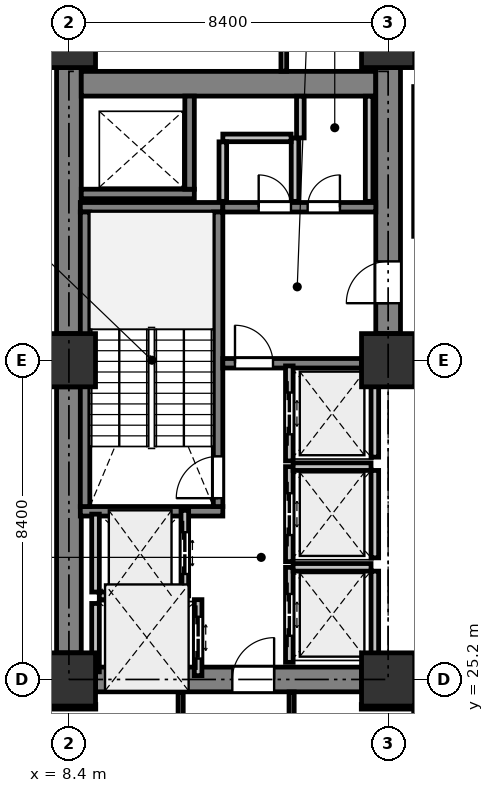
"""IFC4 building model, lengths in metres.
Left out: names, types, materials, properties, quantities, classifications, styles, units other than length and angle.
Written with IfcOpenShell. Run it as: python <this file> out.ifc"""

import sys

from ifc_helpers import new_model, si_unit, direction, frame, frame_2d, origin, origin_2d, place, context, subcontext, project, spatial, rectangle, extrude, element, fill, save


model = new_model("IFC4")
c1 = context("Model", 3, precision=1e-05, world=origin(), true_north=direction((0.0, 1.0)))
c2 = subcontext(c1, "Body", "Model", "MODEL_VIEW")
j1 = project(units=[si_unit("LENGTHUNIT", "METRE"), si_unit("PLANEANGLEUNIT", "RADIAN")], contexts=[c1])
p1 = place(None, origin())
s1 = spatial("IfcSite", under=j1, at=p1, CompositionType="ELEMENT")
p2 = place(p1, origin())
s2 = spatial("IfcBuilding", under=s1, at=p2, CompositionType="ELEMENT")
p3 = place(p2, frame((0.0, 0.0, 50.0)))
s3 = spatial("IfcBuildingStorey", under=s2, at=p3, CompositionType="ELEMENT", Elevation=50.0)
for number, where, z_axis, x_axis in (
    (1, (8.4, 25.2, 0.0), (0.0, 0.0, 1.0), (1.0, 0.0, 0.0)),
    (2, (8.4, 33.6, 0.0), (0.0, 0.0, 1.0), (1.0, 0.0, 0.0)),
    (3, (8.4, 42.0, 0.0), (0.0, 0.0, 1.0), (1.0, 0.0, 0.0)),
    (4, (16.8, 25.2, 0.0), (0.0, 0.0, 1.0), (1.0, 0.0, 0.0)),
    (5, (16.8, 33.6, 0.0), (0.0, 0.0, 1.0), (1.0, 0.0, 0.0)),
    (6, (16.8, 42.0, 0.0), (0.0, 0.0, 1.0), (1.0, 0.0, 0.0)),
):
    element("IfcColumn", number, at=place(p3, frame(where, z_axis=z_axis, x_axis=x_axis)), inside=s3, PredefinedType="COLUMN", context=c2, shape_type="SweptSolid", body=[
        extrude(rectangle(XDim=1.4, YDim=1.4, at=origin_2d()), origin(), (0.0, 0.0, 1.0), 4.2),
    ])
for number, where, z_axis, x_axis in (
    (7, (8.4, 25.9, 0.0), (0.0, 0.0, 1.0), (0.0, 1.0, 0.0)),
    (8, (8.4, 34.3, 0.0), (0.0, 0.0, 1.0), (0.0, 1.0, 0.0)),
):
    element("IfcWall", number, at=place(p3, frame(where, z_axis=z_axis, x_axis=x_axis)), inside=s3, PredefinedType="SHEAR", context=c2, shape_type="SweptSolid", body=[
        extrude(rectangle(XDim=7.0, YDim=0.65, at=frame_2d((3.5, 0.0))), origin(), (0.0, 0.0, 1.0), 3.925),
    ])
p4 = place(p3, frame((8.725, 40.875, 0.0), z_axis=(0.0, 0.0, 1.0), x_axis=(1.0, 0.0, 0.0)))
e9 = element("IfcWall", 9, at=p4, inside=s3, PredefinedType="SHEAR", context=c2, shape_type="SweptSolid", body=[
    extrude(rectangle(XDim=7.75, YDim=0.65, at=frame_2d((3.875, 0.0))), origin(), (0.0, 0.0, 1.0), 3.925),
])
p5 = place(p3, frame((16.8, 34.3, 0.0), z_axis=(0.0, 0.0, 1.0), x_axis=(0.0, 1.0, 0.0)))
e10 = element("IfcWall", 10, at=p5, inside=s3, PredefinedType="SHEAR", context=c2, shape_type="SweptSolid", body=[
    extrude(rectangle(XDim=7.0, YDim=0.65, at=frame_2d((3.5, 0.0))), origin(), (0.0, 0.0, 1.0), 3.925),
])
p6 = place(p5, frame((0.8, 0.0, 0.0)))
e11 = element("IfcOpeningElement", 11, at=p6, cuts=e10, PredefinedType="OPENING", context=c2, shape_type="SweptSolid", body=[
    extrude(rectangle(XDim=1.1, YDim=2.15, at=frame_2d((0.55, 1.075))), frame((0.0, 0.335, 0.0), z_axis=(0.0, -1.0, 0.0), x_axis=(1.0, 0.0, 0.0)), (0.0, 0.0, 1.0), 0.67),
])
p7 = place(p3, frame((9.1, 25.2, 0.0), z_axis=(0.0, 0.0, 1.0), x_axis=(1.0, 0.0, 0.0)))
e12 = element("IfcWall", 12, at=p7, inside=s3, PredefinedType="SHEAR", context=c2, shape_type="SweptSolid", body=[
    extrude(rectangle(XDim=7.0, YDim=0.65, at=frame_2d((3.5, 0.0))), origin(), (0.0, 0.0, 1.0), 3.925),
])
p8 = place(p7, frame((3.6, 0.0, 0.0)))
e13 = element("IfcOpeningElement", 13, at=p8, cuts=e12, PredefinedType="OPENING", context=c2, shape_type="SweptSolid", body=[
    extrude(rectangle(XDim=1.1, YDim=2.15, at=frame_2d((0.55, 1.075))), frame((0.0, 0.335, 0.0), z_axis=(0.0, -1.0, 0.0), x_axis=(1.0, 0.0, 0.0)), (0.0, 0.0, 1.0), 0.67),
])
for number, where, z_axis, x_axis in (
    (14, (12.45, 29.625, 0.0), (0.0, 0.0, 1.0), (-1.0, 0.0, 0.0)),
    (15, (12.45, 37.625, 0.0), (0.0, 0.0, 1.0), (-1.0, 0.0, 0.0)),
):
    element("IfcWall", number, at=place(p3, frame(where, z_axis=z_axis, x_axis=x_axis)), inside=s3, PredefinedType="SHEAR", context=c2, shape_type="SweptSolid", body=[
        extrude(rectangle(XDim=3.75, YDim=0.25, at=frame_2d((1.875, 0.0))), origin(), (0.0, 0.0, 1.0), 3.925),
    ])
p9 = place(p3, frame((12.325, 29.75, 0.0), z_axis=(0.0, 0.0, 1.0), x_axis=(0.0, 1.0, 0.0)))
e16 = element("IfcWall", 16, at=p9, inside=s3, PredefinedType="SHEAR", context=c2, shape_type="SweptSolid", body=[
    extrude(rectangle(XDim=7.75, YDim=0.25, at=frame_2d((3.875, 0.0))), origin(), (0.0, 0.0, 1.0), 3.925),
])
p10 = place(p9, frame((0.22, 0.0, 0.0)))
e17 = element("IfcOpeningElement", 17, at=p10, cuts=e16, PredefinedType="OPENING", context=c2, shape_type="SweptSolid", body=[
    extrude(rectangle(XDim=1.1, YDim=2.15, at=frame_2d((0.55, 1.075))), frame((0.0, 0.135, 0.0), z_axis=(0.0, -1.0, 0.0), x_axis=(1.0, 0.0, 0.0)), (0.0, 0.0, 1.0), 0.27),
])
p11 = place(p3, frame((8.825, 29.75, 0.0), z_axis=(0.0, 0.0, 1.0), x_axis=(0.0, 1.0, 0.0)))
e18 = element("IfcWall", 18, at=p11, inside=s3, PredefinedType="SHEAR", context=c2, shape_type="SweptSolid", body=[
    extrude(rectangle(XDim=7.75, YDim=0.25, at=frame_2d((3.875, 0.0))), origin(), (0.0, 0.0, 1.0), 3.925),
])
p12 = place(p3, frame((8.725, 37.975, 0.0), z_axis=(0.0, 0.0, 1.0), x_axis=(1.0, 0.0, 0.0)))
e19 = element("IfcWall", 19, at=p12, inside=s3, PredefinedType="SHEAR", context=c2, shape_type="SweptSolid", body=[
    extrude(rectangle(XDim=2.975, YDim=0.25, at=frame_2d((1.487, 0.0))), origin(), (0.0, 0.0, 1.0), 3.925),
])
p13 = place(p3, frame((11.575, 38.1, 0.0), z_axis=(0.0, 0.0, 1.0), x_axis=(0.0, 1.0, 0.0)))
e20 = element("IfcWall", 20, at=p13, inside=s3, PredefinedType="SHEAR", context=c2, shape_type="SweptSolid", body=[
    extrude(rectangle(XDim=2.45, YDim=0.25, at=frame_2d((1.225, 0.0))), origin(), (0.0, 0.0, 1.0), 3.925),
])
p14 = place(p3, frame((12.45, 33.52, 0.0), z_axis=(0.0, 0.0, 1.0), x_axis=(1.0, 0.0, 0.0)))
e21 = element("IfcWall", 21, at=p14, inside=s3, PredefinedType="SHEAR", context=c2, shape_type="SweptSolid", body=[
    extrude(rectangle(XDim=3.65, YDim=0.25, at=frame_2d((1.825, 0.0))), origin(), (0.0, 0.0, 1.0), 3.925),
])
p15 = place(p14, frame((0.32, 0.0, 0.0)))
e22 = element("IfcOpeningElement", 22, at=p15, cuts=e21, PredefinedType="OPENING", context=c2, shape_type="SweptSolid", body=[
    extrude(rectangle(XDim=1.0, YDim=2.15, at=frame_2d((0.5, 1.075))), frame((0.0, 0.135, 0.0), z_axis=(0.0, -1.0, 0.0), x_axis=(1.0, 0.0, 0.0)), (0.0, 0.0, 1.0), 0.27),
])
p16 = place(p3, frame((12.45, 37.625, 0.0), z_axis=(0.0, 0.0, 1.0), x_axis=(1.0, 0.0, 0.0)))
e23 = element("IfcWall", 23, at=p16, inside=s3, PredefinedType="SHEAR", context=c2, shape_type="SweptSolid", body=[
    extrude(rectangle(XDim=4.025, YDim=0.25, at=frame_2d((2.013, 0.0))), origin(), (0.0, 0.0, 1.0), 3.925),
])
p17 = place(p16, frame((0.944, 0.0, 0.0)))
e24 = element("IfcOpeningElement", 24, at=p17, cuts=e23, PredefinedType="OPENING", context=c2, shape_type="SweptSolid", body=[
    extrude(rectangle(XDim=0.85, YDim=2.15, at=frame_2d((0.425, 1.075))), frame((0.0, 0.135, 0.0), z_axis=(0.0, -1.0, 0.0), x_axis=(1.0, 0.0, 0.0)), (0.0, 0.0, 1.0), 0.27),
])
p18 = place(p16, frame((2.231, 0.0, 0.0)))
e25 = element("IfcOpeningElement", 25, at=p18, cuts=e23, PredefinedType="OPENING", context=c2, shape_type="SweptSolid", body=[
    extrude(rectangle(XDim=0.85, YDim=2.15, at=frame_2d((0.425, 1.075))), frame((0.0, 0.135, 0.0), z_axis=(0.0, -1.0, 0.0), x_axis=(1.0, 0.0, 0.0)), (0.0, 0.0, 1.0), 0.27),
])
p19 = place(p3, frame((11.45, 27.4, 0.0), z_axis=(0.0, 0.0, 1.0), x_axis=(0.0, 1.0, 0.0)))
e26 = element("IfcWall", 26, at=p19, inside=s3, PredefinedType="PARTITIONING", context=c2, shape_type="SweptSolid", body=[
    extrude(rectangle(XDim=2.25, YDim=0.2, at=frame_2d((1.125, 0.0))), origin(), (0.0, 0.0, 1.0), 3.925),
])
p20 = place(p19, frame((0.575, 0.0, 0.0)))
e27 = element("IfcOpeningElement", 27, at=p20, cuts=e26, PredefinedType="OPENING", context=c2, shape_type="SweptSolid", body=[
    extrude(rectangle(XDim=1.1, YDim=2.2, at=frame_2d((0.55, 1.1))), frame((0.0, 0.11, 0.0), z_axis=(0.0, -1.0, 0.0), x_axis=(1.0, 0.0, 0.0)), (0.0, 0.0, 1.0), 0.22),
])
p21 = place(p3, frame((9.1, 27.5, 0.0), z_axis=(0.0, 0.0, 1.0), x_axis=(0.0, 1.0, 0.0)))
e28 = element("IfcWall", 28, at=p21, inside=s3, PredefinedType="PARTITIONING", context=c2, shape_type="SweptSolid", body=[
    extrude(rectangle(XDim=2.05, YDim=0.2, at=frame_2d((1.025, 0.0))), origin(), (0.0, 0.0, 1.0), 3.925),
])
p22 = place(p3, frame((9.2, 27.4, 0.0), z_axis=(0.0, 0.0, 1.0), x_axis=(1.0, 0.0, 0.0)))
e29 = element("IfcWall", 29, at=p22, inside=s3, PredefinedType="PARTITIONING", context=c2, shape_type="SweptSolid", body=[
    extrude(rectangle(XDim=2.15, YDim=0.2, at=frame_2d((1.075, 0.0))), origin(), (0.0, 0.0, 1.0), 3.925),
])
p23 = place(p3, frame((11.8, 25.3, 0.0), z_axis=(0.0, 0.0, 1.0), x_axis=(0.0, 1.0, 0.0)))
e30 = element("IfcWall", 30, at=p23, inside=s3, PredefinedType="PARTITIONING", context=c2, shape_type="SweptSolid", body=[
    extrude(rectangle(XDim=2.0, YDim=0.2, at=frame_2d((1.0, 0.0))), origin(), (0.0, 0.0, 1.0), 3.925),
])
p24 = place(p23, frame((0.45, 0.0, 0.0)))
e31 = element("IfcOpeningElement", 31, at=p24, cuts=e30, PredefinedType="OPENING", context=c2, shape_type="SweptSolid", body=[
    extrude(rectangle(XDim=1.1, YDim=2.2, at=frame_2d((0.55, 1.1))), frame((0.0, 0.11, 0.0), z_axis=(0.0, -1.0, 0.0), x_axis=(1.0, 0.0, 0.0)), (0.0, 0.0, 1.0), 0.22),
])
p25 = place(p3, frame((9.1, 25.4, 0.0), z_axis=(0.0, 0.0, 1.0), x_axis=(0.0, 1.0, 0.0)))
e32 = element("IfcWall", 32, at=p25, inside=s3, PredefinedType="PARTITIONING", context=c2, shape_type="SweptSolid", body=[
    extrude(rectangle(XDim=1.8, YDim=0.2, at=frame_2d((0.9, 0.0))), origin(), (0.0, 0.0, 1.0), 3.925),
])
p26 = place(p3, frame((14.2, 25.65, 0.0), z_axis=(0.0, 0.0, 1.0), x_axis=(0.0, 1.0, 0.0)))
e33 = element("IfcWall", 33, at=p26, inside=s3, PredefinedType="PARTITIONING", context=c2, shape_type="SweptSolid", body=[
    extrude(rectangle(XDim=2.5, YDim=0.2, at=frame_2d((1.25, 0.0))), origin(), (0.0, 0.0, 1.0), 3.925),
])
p27 = place(p26, frame((0.7, 0.0, 0.0)))
e34 = element("IfcOpeningElement", 34, at=p27, cuts=e33, PredefinedType="OPENING", context=c2, shape_type="SweptSolid", body=[
    extrude(rectangle(XDim=1.1, YDim=2.2, at=frame_2d((0.55, 1.1))), frame((0.0, 0.11, 0.0), z_axis=(0.0, -1.0, 0.0), x_axis=(1.0, 0.0, 0.0)), (0.0, 0.0, 1.0), 0.22),
])
p28 = place(p3, frame((16.45, 25.75, 0.0), z_axis=(0.0, 0.0, 1.0), x_axis=(0.0, 1.0, 0.0)))
e35 = element("IfcWall", 35, at=p28, inside=s3, PredefinedType="PARTITIONING", context=c2, shape_type="SweptSolid", body=[
    extrude(rectangle(XDim=2.3, YDim=0.2, at=frame_2d((1.15, 0.0))), origin(), (0.0, 0.0, 1.0), 3.925),
])
p29 = place(p3, frame((14.3, 28.15, 0.0), z_axis=(0.0, 0.0, 1.0), x_axis=(1.0, 0.0, 0.0)))
e36 = element("IfcWall", 36, at=p29, inside=s3, PredefinedType="PARTITIONING", context=c2, shape_type="SweptSolid", body=[
    extrude(rectangle(XDim=2.05, YDim=0.2, at=frame_2d((1.025, 0.0))), origin(), (0.0, 0.0, 1.0), 3.925),
])
p30 = place(p3, frame((14.2, 28.3, 0.0), z_axis=(0.0, 0.0, 1.0), x_axis=(0.0, 1.0, 0.0)))
e37 = element("IfcWall", 37, at=p30, inside=s3, PredefinedType="PARTITIONING", context=c2, shape_type="SweptSolid", body=[
    extrude(rectangle(XDim=2.5, YDim=0.2, at=frame_2d((1.25, 0.0))), origin(), (0.0, 0.0, 1.0), 3.925),
])
p31 = place(p30, frame((0.7, 0.0, 0.0)))
e38 = element("IfcOpeningElement", 38, at=p31, cuts=e37, PredefinedType="OPENING", context=c2, shape_type="SweptSolid", body=[
    extrude(rectangle(XDim=1.1, YDim=2.2, at=frame_2d((0.55, 1.1))), frame((0.0, 0.11, 0.0), z_axis=(0.0, -1.0, 0.0), x_axis=(1.0, 0.0, 0.0)), (0.0, 0.0, 1.0), 0.22),
])
p32 = place(p3, frame((16.45, 28.4, 0.0), z_axis=(0.0, 0.0, 1.0), x_axis=(0.0, 1.0, 0.0)))
e39 = element("IfcWall", 39, at=p32, inside=s3, PredefinedType="PARTITIONING", context=c2, shape_type="SweptSolid", body=[
    extrude(rectangle(XDim=2.3, YDim=0.2, at=frame_2d((1.15, 0.0))), origin(), (0.0, 0.0, 1.0), 3.925),
])
p33 = place(p3, frame((14.3, 30.8, 0.0), z_axis=(0.0, 0.0, 1.0), x_axis=(1.0, 0.0, 0.0)))
e40 = element("IfcWall", 40, at=p33, inside=s3, PredefinedType="PARTITIONING", context=c2, shape_type="SweptSolid", body=[
    extrude(rectangle(XDim=2.05, YDim=0.2, at=frame_2d((1.025, 0.0))), origin(), (0.0, 0.0, 1.0), 3.925),
])
p34 = place(p3, frame((14.2, 30.95, 0.0), z_axis=(0.0, 0.0, 1.0), x_axis=(0.0, 1.0, 0.0)))
e41 = element("IfcWall", 41, at=p34, inside=s3, PredefinedType="PARTITIONING", context=c2, shape_type="SweptSolid", body=[
    extrude(rectangle(XDim=2.5, YDim=0.2, at=frame_2d((1.25, 0.0))), origin(), (0.0, 0.0, 1.0), 3.925),
])
p35 = place(p34, frame((0.7, 0.0, 0.0)))
e42 = element("IfcOpeningElement", 42, at=p35, cuts=e41, PredefinedType="OPENING", context=c2, shape_type="SweptSolid", body=[
    extrude(rectangle(XDim=1.1, YDim=2.2, at=frame_2d((0.55, 1.1))), frame((0.0, 0.11, 0.0), z_axis=(0.0, -1.0, 0.0), x_axis=(1.0, 0.0, 0.0)), (0.0, 0.0, 1.0), 0.22),
])
p36 = place(p3, frame((16.45, 31.05, 0.0), z_axis=(0.0, 0.0, 1.0), x_axis=(0.0, 1.0, 0.0)))
e43 = element("IfcWall", 43, at=p36, inside=s3, PredefinedType="PARTITIONING", context=c2, shape_type="SweptSolid", body=[
    extrude(rectangle(XDim=2.3, YDim=0.2, at=frame_2d((1.15, 0.0))), origin(), (0.0, 0.0, 1.0), 3.925),
])
p37 = place(p3, frame((14.35, 37.78, 0.0), z_axis=(0.0, 0.0, 1.0), x_axis=(0.0, 1.0, 0.0)))
e44 = element("IfcWall", 44, at=p37, inside=s3, PredefinedType="PARTITIONING", context=c2, shape_type="SweptSolid", body=[
    extrude(rectangle(XDim=1.67, YDim=0.2, at=frame_2d((0.835, 0.0))), origin(), (0.0, 0.0, 1.0), 2.825),
])
p38 = place(p3, frame((14.246, 39.45, 0.0), z_axis=(0.0, 0.0, 1.0), x_axis=(-1.0, 0.0, 0.0)))
e45 = element("IfcWall", 45, at=p38, inside=s3, PredefinedType="PARTITIONING", context=c2, shape_type="SweptSolid", body=[
    extrude(rectangle(XDim=1.796, YDim=0.2, at=frame_2d((0.898, 0.0))), origin(), (0.0, 0.0, 1.0), 2.825),
])
p39 = place(p3, frame((12.45, 39.346, 0.0), z_axis=(0.0, 0.0, 1.0), x_axis=(0.0, -1.0, 0.0)))
e46 = element("IfcWall", 46, at=p39, inside=s3, PredefinedType="PARTITIONING", context=c2, shape_type="SweptSolid", body=[
    extrude(rectangle(XDim=1.566, YDim=0.2, at=frame_2d((0.783, 0.0))), origin(), (0.0, 0.0, 1.0), 2.825),
])
p40 = place(p3, frame((16.3, 37.78, 0.0), z_axis=(0.0, 0.0, 1.0), x_axis=(0.0, 1.0, 0.0)))
e47 = element("IfcWall", 47, at=p40, inside=s3, PredefinedType="PARTITIONING", context=c2, shape_type="SweptSolid", body=[
    extrude(rectangle(XDim=2.766, YDim=0.2, at=frame_2d((1.383, 0.0))), origin(), (0.0, 0.0, 1.0), 2.825),
])
p41 = place(p3, frame((14.49, 40.546, 0.0), z_axis=(0.0, 0.0, 1.0), x_axis=(0.0, -1.0, 0.0)))
e48 = element("IfcWall", 48, at=p41, inside=s3, PredefinedType="PARTITIONING", context=c2, shape_type="SweptSolid", body=[
    extrude(rectangle(XDim=1.096, YDim=0.2, at=frame_2d((0.548, 0.0))), origin(), (0.0, 0.0, 1.0), 2.825),
])
p42 = place(p3, frame((14.26, 24.871, 0.0), z_axis=(0.0, 0.0, 1.0), x_axis=(0.0, -1.0, 0.0)))
e49 = element("IfcWall", 49, at=p42, inside=s3, PredefinedType="PARTITIONING", context=c2, shape_type="SweptSolid", body=[
    extrude(rectangle(XDim=4.911, YDim=0.135, at=frame_2d((2.456, 0.0))), origin(), (0.0, 0.0, 1.0), 3.925),
])
p43 = place(p3, frame((17.54, 20.031, 0.0), z_axis=(0.0, 0.0, 1.0), x_axis=(0.0, 1.0, 0.0)))
e50 = element("IfcWall", 50, at=p43, inside=s3, PredefinedType="PARTITIONING", context=c2, shape_type="SweptSolid", body=[
    extrude(rectangle(XDim=5.168, YDim=0.135, at=frame_2d((2.584, 0.0))), origin(), (0.0, 0.0, 1.0), 3.313),
])
p44 = place(p43, frame((2.124, 0.0, 0.0)))
e51 = element("IfcOpeningElement", 51, at=p44, cuts=e50, PredefinedType="OPENING", context=c2, shape_type="SweptSolid", body=[
    extrude(rectangle(XDim=0.92, YDim=2.1, at=frame_2d((0.46, 1.05))), frame((0.0, 0.077, 0.0), z_axis=(0.0, -1.0, 0.0), x_axis=(1.0, 0.0, 0.0)), (0.0, 0.0, 1.0), 0.155),
])
p45 = place(p3, frame((17.469, 24.48, 0.0), z_axis=(0.0, 0.0, 1.0), x_axis=(-0.99999993688, 0.000355302873, 0.0)))
e52 = element("IfcWall", 52, at=p45, inside=s3, PredefinedType="PARTITIONING", context=c2, shape_type="SweptSolid", body=[
    extrude(rectangle(XDim=1.374, YDim=0.12, at=frame_2d((0.687, 0.0))), origin(), (0.0, 0.0, 1.0), 3.323),
])
p46 = place(p3, frame((9.106, 24.481, 0.0), z_axis=(0.0, 0.0, 1.0), x_axis=(-0.999999755233, -0.000699667487, 0.0)))
e53 = element("IfcWall", 53, at=p46, inside=s3, PredefinedType="PARTITIONING", context=c2, shape_type="SweptSolid", body=[
    extrude(rectangle(XDim=1.396, YDim=0.12, at=frame_2d((0.698, 0.0))), origin(), (0.0, 0.0, 1.0), 3.323),
])
p47 = place(p3, frame((11.34, 20.031, 0.0), z_axis=(0.0, 0.0, 1.0), x_axis=(0.0, 1.0, 0.0)))
e54 = element("IfcWall", 54, at=p47, inside=s3, PredefinedType="PARTITIONING", context=c2, shape_type="SweptSolid", body=[
    extrude(rectangle(XDim=4.84, YDim=0.135, at=frame_2d((2.42, 0.0))), origin(), (0.0, 0.0, 1.0), 3.925),
])
p48 = place(p47, frame((1.945, 0.0, 0.0)))
e55 = element("IfcOpeningElement", 55, at=p48, cuts=e54, PredefinedType="OPENING", context=c2, shape_type="SweptSolid", body=[
    extrude(rectangle(XDim=0.95, YDim=2.15, at=frame_2d((0.475, 1.075))), frame((0.0, 0.077, 0.0), z_axis=(0.0, -1.0, 0.0), x_axis=(1.0, 0.0, 0.0)), (0.0, 0.0, 1.0), 0.155),
])
p49 = place(p3, frame((14.055, 50.231, 0.0), z_axis=(0.0, 0.0, 1.0), x_axis=(0.0, -1.0, 0.0)))
e56 = element("IfcWall", 56, at=p49, inside=s3, PredefinedType="PARTITIONING", context=c2, shape_type="SweptSolid", body=[
    extrude(rectangle(XDim=9.027, YDim=0.15, at=frame_2d((4.513, 0.0))), origin(), (0.0, 0.0, 1.0), 3.313),
])
p50 = place(p3, frame((17.54, 36.86, 0.0), z_axis=(0.0, 0.0, 1.0), x_axis=(0.0, 1.0, 0.0)))
e57 = element("IfcWall", 57, at=p50, inside=s3, PredefinedType="PARTITIONING", context=c2, shape_type="SweptSolid", body=[
    extrude(rectangle(XDim=3.94, YDim=0.135, at=frame_2d((1.97, 0.0))), origin(), (0.0, 0.0, 1.0), 3.925),
])
p51 = place(p6, origin())
e58 = element("IfcDoor", 58, at=p51, inside=s3, OperationType="SINGLE_SWING_LEFT", PredefinedType="DOOR", context=c2, shape_type="SweptSolid", body=[
    extrude(rectangle(XDim=1.1, YDim=2.15, at=frame_2d((0.55, 1.075))), frame((0.0, 0.025, 0.0), z_axis=(0.0, -1.0, 0.0), x_axis=(1.0, 0.0, 0.0)), (0.0, 0.0, 1.0), 0.05),
])
fill(e11, e58)
p52 = place(p8, origin())
e59 = element("IfcDoor", 59, at=p52, inside=s3, OperationType="SINGLE_SWING_RIGHT", PredefinedType="DOOR", context=c2, shape_type="SweptSolid", body=[
    extrude(rectangle(XDim=1.1, YDim=2.15, at=frame_2d((0.55, 1.075))), frame((0.0, 0.025, 0.0), z_axis=(0.0, -1.0, 0.0), x_axis=(1.0, 0.0, 0.0)), (0.0, 0.0, 1.0), 0.05),
])
fill(e13, e59)
p53 = place(p10, origin())
e60 = element("IfcDoor", 60, at=p53, inside=s3, OperationType="SINGLE_SWING_LEFT", PredefinedType="DOOR", context=c2, shape_type="SweptSolid", body=[
    extrude(rectangle(XDim=1.1, YDim=2.15, at=frame_2d((0.55, 1.075))), frame((0.0, 0.025, 0.0), z_axis=(0.0, -1.0, 0.0), x_axis=(1.0, 0.0, 0.0)), (0.0, 0.0, 1.0), 0.05),
])
fill(e17, e60)
p54 = place(p15, origin())
e61 = element("IfcDoor", 61, at=p54, inside=s3, OperationType="SINGLE_SWING_LEFT", PredefinedType="DOOR", context=c2, shape_type="SweptSolid", body=[
    extrude(rectangle(XDim=1.0, YDim=2.15, at=frame_2d((0.5, 1.075))), frame((0.0, 0.025, 0.0), z_axis=(0.0, -1.0, 0.0), x_axis=(1.0, 0.0, 0.0)), (0.0, 0.0, 1.0), 0.05),
])
fill(e22, e61)
p55 = place(p20, origin())
e62 = element("IfcDoor", 62, at=p55, inside=s3, OperationType="DOUBLE_DOOR_SLIDING", PredefinedType="DOOR", context=c2, shape_type="SweptSolid", body=[
    extrude(rectangle(XDim=1.1, YDim=2.2, at=frame_2d((0.55, 1.1))), frame((0.0, 0.025, 0.0), z_axis=(0.0, -1.0, 0.0), x_axis=(1.0, 0.0, 0.0)), (0.0, 0.0, 1.0), 0.05),
])
fill(e27, e62)
p56 = place(p24, origin())
e63 = element("IfcDoor", 63, at=p56, inside=s3, OperationType="DOUBLE_DOOR_SLIDING", PredefinedType="DOOR", context=c2, shape_type="SweptSolid", body=[
    extrude(rectangle(XDim=1.1, YDim=2.2, at=frame_2d((0.55, 1.1))), frame((0.0, 0.025, 0.0), z_axis=(0.0, -1.0, 0.0), x_axis=(1.0, 0.0, 0.0)), (0.0, 0.0, 1.0), 0.05),
])
fill(e31, e63)
p57 = place(p27, origin())
e64 = element("IfcDoor", 64, at=p57, inside=s3, OperationType="DOUBLE_DOOR_SLIDING", PredefinedType="DOOR", context=c2, shape_type="SweptSolid", body=[
    extrude(rectangle(XDim=1.1, YDim=2.2, at=frame_2d((0.55, 1.1))), frame((0.0, 0.025, 0.0), z_axis=(0.0, -1.0, 0.0), x_axis=(1.0, 0.0, 0.0)), (0.0, 0.0, 1.0), 0.05),
])
fill(e34, e64)
p58 = place(p31, origin())
e65 = element("IfcDoor", 65, at=p58, inside=s3, OperationType="DOUBLE_DOOR_SLIDING", PredefinedType="DOOR", context=c2, shape_type="SweptSolid", body=[
    extrude(rectangle(XDim=1.1, YDim=2.2, at=frame_2d((0.55, 1.1))), frame((0.0, 0.025, 0.0), z_axis=(0.0, -1.0, 0.0), x_axis=(1.0, 0.0, 0.0)), (0.0, 0.0, 1.0), 0.05),
])
fill(e38, e65)
p59 = place(p35, origin())
e66 = element("IfcDoor", 66, at=p59, inside=s3, OperationType="DOUBLE_DOOR_SLIDING", PredefinedType="DOOR", context=c2, shape_type="SweptSolid", body=[
    extrude(rectangle(XDim=1.1, YDim=2.2, at=frame_2d((0.55, 1.1))), frame((0.0, 0.025, 0.0), z_axis=(0.0, -1.0, 0.0), x_axis=(1.0, 0.0, 0.0)), (0.0, 0.0, 1.0), 0.05),
])
fill(e42, e66)
p60 = place(p17, origin())
e67 = element("IfcDoor", 67, at=p60, inside=s3, OperationType="SINGLE_SWING_LEFT", PredefinedType="DOOR", context=c2, shape_type="SweptSolid", body=[
    extrude(rectangle(XDim=0.85, YDim=2.15, at=frame_2d((0.425, 1.075))), frame((0.0, 0.025, 0.0), z_axis=(0.0, -1.0, 0.0), x_axis=(1.0, 0.0, 0.0)), (0.0, 0.0, 1.0), 0.05),
])
fill(e24, e67)
p61 = place(p18, origin())
e68 = element("IfcDoor", 68, at=p61, inside=s3, OperationType="SINGLE_SWING_RIGHT", PredefinedType="DOOR", context=c2, shape_type="SweptSolid", body=[
    extrude(rectangle(XDim=0.85, YDim=2.15, at=frame_2d((0.425, 1.075))), frame((0.0, 0.025, 0.0), z_axis=(0.0, -1.0, 0.0), x_axis=(1.0, 0.0, 0.0)), (0.0, 0.0, 1.0), 0.05),
])
fill(e25, e68)
save(model, sys.argv[1])
